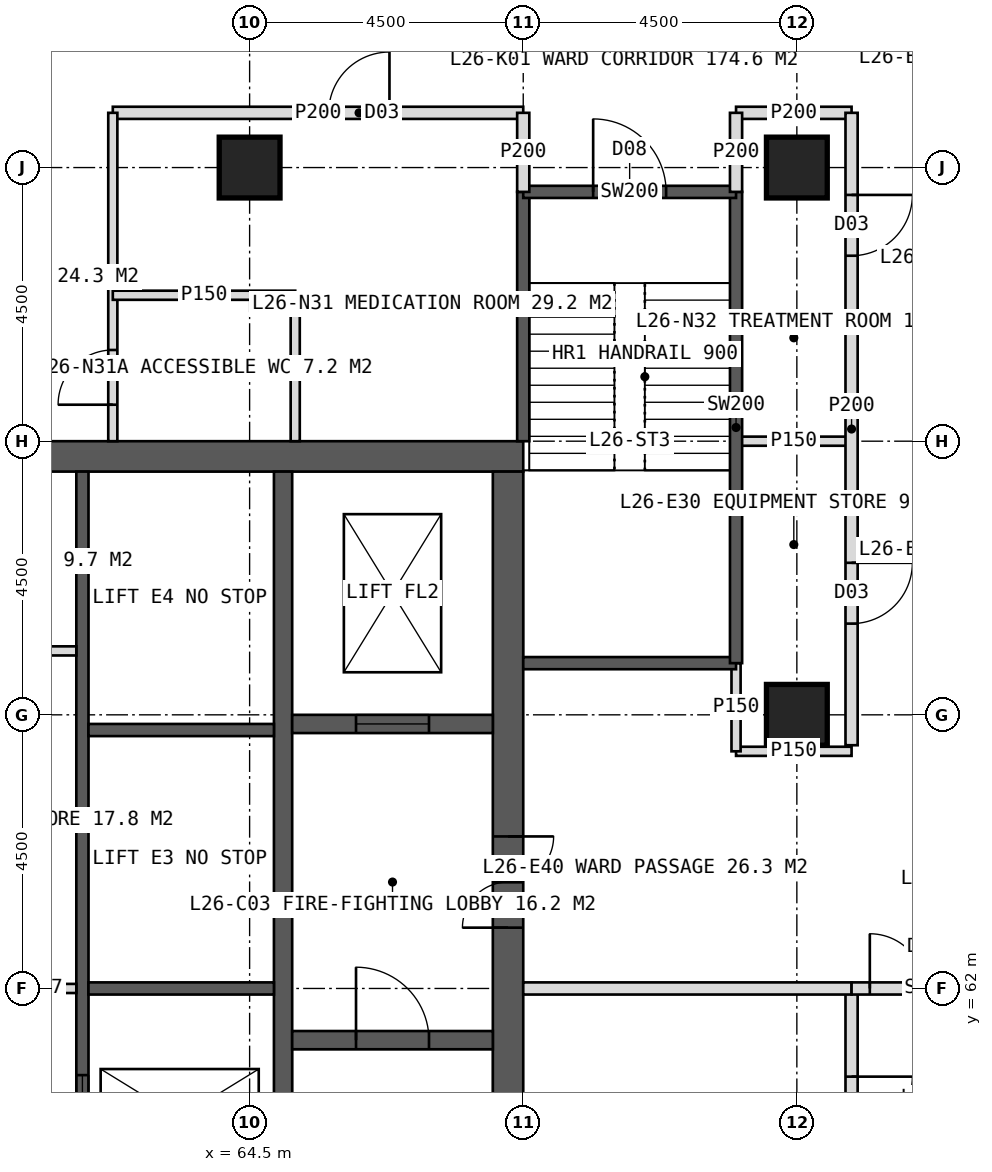
"""IFC4 building model, lengths in metres.
Left out: names, types, materials, properties, quantities, classifications, styles, units other than length and angle.
Written with IfcOpenShell. Run it as: python <this file> out.ifc"""

import sys

from ifc_helpers import new_model, si_unit, direction, frame, frame_2d, origin, origin_2d, place, context, subcontext, project, spatial, rectangle, hollow_rectangle, extrude, element, fill, save


model = new_model("IFC4")
c1 = context("Model", 3, precision=1e-05, world=origin(), true_north=direction((0.0, 1.0)))
c2 = subcontext(c1, "Body", "Model", "MODEL_VIEW")
j1 = project(units=[si_unit("LENGTHUNIT", "METRE"), si_unit("PLANEANGLEUNIT", "RADIAN")], contexts=[c1])
p1 = place(None, origin())
s1 = spatial("IfcSite", under=j1, at=p1, CompositionType="ELEMENT")
p2 = place(p1, origin())
s2 = spatial("IfcBuilding", under=s1, at=p2, CompositionType="ELEMENT")
p3 = place(p2, frame((0.0, 0.0, 112.0)))
s3 = spatial("IfcBuildingStorey", under=s2, at=p3, CompositionType="ELEMENT", Elevation=112.0)
p4 = place(p3, frame((51.0, 70.75, 0.0), z_axis=(0.0, 0.0, 1.0), x_axis=(1.0, 0.0, 0.0)))
e1 = element("IfcWall", 1, at=p4, inside=s3, PredefinedType="SHEAR", context=c2, shape_type="SweptSolid", body=[
    extrude(rectangle(XDim=18.0, YDim=0.5, at=frame_2d((9.0, 0.0))), origin(), (0.0, 0.0, 1.0), 4.0),
])
p5 = place(p4, frame((8.1, 0.0, 0.0)))
e2 = element("IfcOpeningElement", 2, at=p5, cuts=e1, PredefinedType="OPENING", context=c2, shape_type="SweptSolid", body=[
    extrude(rectangle(XDim=1.8, YDim=2.2, at=frame_2d((0.9, 1.1))), frame((0.0, 0.26, 0.0), z_axis=(0.0, -1.0, 0.0), x_axis=(1.0, 0.0, 0.0)), (0.0, 0.0, 1.0), 0.52),
])
p6 = place(p3, frame((68.75, 53.5, 0.0), z_axis=(0.0, 0.0, 1.0), x_axis=(0.0, 1.0, 0.0)))
e3 = element("IfcWall", 3, at=p6, inside=s3, PredefinedType="SHEAR", context=c2, shape_type="SweptSolid", body=[
    extrude(rectangle(XDim=17.0, YDim=0.5, at=frame_2d((8.5, 0.0))), origin(), (0.0, 0.0, 1.0), 4.0),
])
p7 = place(p6, frame((9.5, 0.0, 0.0)))
e4 = element("IfcOpeningElement", 4, at=p7, cuts=e3, PredefinedType="OPENING", context=c2, shape_type="SweptSolid", body=[
    extrude(rectangle(XDim=1.5, YDim=2.2, at=frame_2d((0.75, 1.1))), frame((0.0, 0.26, 0.0), z_axis=(0.0, -1.0, 0.0), x_axis=(1.0, 0.0, 0.0)), (0.0, 0.0, 1.0), 0.52),
])
p8 = place(p3, frame((65.05, 53.5, 0.0), z_axis=(0.0, 0.0, 1.0), x_axis=(0.0, 1.0, 0.0)))
e5 = element("IfcWall", 5, at=p8, inside=s3, PredefinedType="SHEAR", context=c2, shape_type="SweptSolid", body=[
    extrude(rectangle(XDim=17.0, YDim=0.3, at=frame_2d((8.5, 0.0))), origin(), (0.0, 0.0, 1.0), 4.0),
])
p9 = place(p3, frame((61.75, 53.5, 0.0), z_axis=(0.0, 0.0, 1.0), x_axis=(0.0, 1.0, 0.0)))
e6 = element("IfcWall", 6, at=p9, inside=s3, PredefinedType="SHEAR", context=c2, shape_type="SweptSolid", body=[
    extrude(rectangle(XDim=17.0, YDim=0.2, at=frame_2d((8.5, 0.0))), origin(), (0.0, 0.0, 1.0), 4.0),
])
p10 = place(p9, frame((1.375, 0.0, 0.0)))
e7 = element("IfcOpeningElement", 7, at=p10, cuts=e6, PredefinedType="OPENING", context=c2, shape_type="SweptSolid", body=[
    extrude(rectangle(XDim=1.4, YDim=2.2, at=frame_2d((0.7, 1.1))), frame((0.0, 0.11, 0.0), z_axis=(0.0, -1.0, 0.0), x_axis=(1.0, 0.0, 0.0)), (0.0, 0.0, 1.0), 0.22),
])
p11 = place(p9, frame((5.675, 0.0, 0.0)))
e8 = element("IfcOpeningElement", 8, at=p11, cuts=e6, PredefinedType="OPENING", context=c2, shape_type="SweptSolid", body=[
    extrude(rectangle(XDim=1.4, YDim=2.2, at=frame_2d((0.7, 1.1))), frame((0.0, 0.11, 0.0), z_axis=(0.0, -1.0, 0.0), x_axis=(1.0, 0.0, 0.0)), (0.0, 0.0, 1.0), 0.22),
])
for number, where, z_axis, x_axis in (
    (9, (61.85, 62.0, 0.0), (0.0, 0.0, 1.0), (1.0, 0.0, 0.0)),
    (10, (61.85, 66.25, 0.0), (0.0, 0.0, 1.0), (1.0, 0.0, 0.0)),
):
    element("IfcWall", number, at=place(p3, frame(where, z_axis=z_axis, x_axis=x_axis)), inside=s3, PredefinedType="SHEAR", context=c2, shape_type="SweptSolid", body=[
        extrude(rectangle(XDim=3.05, YDim=0.2, at=frame_2d((1.525, 0.0))), origin(), (0.0, 0.0, 1.0), 4.0),
    ])
p12 = place(p3, frame((65.2, 61.15, 0.0), z_axis=(0.0, 0.0, 1.0), x_axis=(1.0, 0.0, 0.0)))
e11 = element("IfcWall", 11, at=p12, inside=s3, PredefinedType="SHEAR", context=c2, shape_type="SweptSolid", body=[
    extrude(rectangle(XDim=3.3, YDim=0.3, at=frame_2d((1.65, 0.0))), origin(), (0.0, 0.0, 1.0), 4.0),
])
p13 = place(p12, frame((1.05, 0.0, 0.0)))
e12 = element("IfcOpeningElement", 12, at=p13, cuts=e11, PredefinedType="OPENING", context=c2, shape_type="SweptSolid", body=[
    extrude(rectangle(XDim=1.2, YDim=2.1, at=frame_2d((0.6, 1.05))), frame((0.0, 0.16, 0.0), z_axis=(0.0, -1.0, 0.0), x_axis=(1.0, 0.0, 0.0)), (0.0, 0.0, 1.0), 0.32),
])
p14 = place(p3, frame((65.2, 66.35, 0.0), z_axis=(0.0, 0.0, 1.0), x_axis=(1.0, 0.0, 0.0)))
e13 = element("IfcWall", 13, at=p14, inside=s3, PredefinedType="SHEAR", context=c2, shape_type="SweptSolid", body=[
    extrude(rectangle(XDim=3.3, YDim=0.3, at=frame_2d((1.65, 0.0))), origin(), (0.0, 0.0, 1.0), 4.0),
])
p15 = place(p14, frame((1.05, 0.0, 0.0)))
e14 = element("IfcOpeningElement", 14, at=p15, cuts=e13, PredefinedType="OPENING", context=c2, shape_type="SweptSolid", body=[
    extrude(rectangle(XDim=1.2, YDim=2.2, at=frame_2d((0.6, 1.1))), frame((0.0, 0.16, 0.0), z_axis=(0.0, -1.0, 0.0), x_axis=(1.0, 0.0, 0.0)), (0.0, 0.0, 1.0), 0.32),
])
for number, where, z_axis, x_axis in (
    (15, (73.5, 75.5, 0.0), (0.0, 0.0, 1.0), (1.0, 0.0, 0.0)),
    (16, (64.5, 75.5, 0.0), (0.0, 0.0, 1.0), (1.0, 0.0, 0.0)),
    (17, (73.5, 66.5, 0.0), (0.0, 0.0, 1.0), (1.0, 0.0, 0.0)),
):
    element("IfcColumn", number, at=place(p3, frame(where, z_axis=z_axis, x_axis=x_axis)), inside=s3, PredefinedType="COLUMN", context=c2, shape_type="SweptSolid", body=[
        extrude(hollow_rectangle(XDim=1.0, YDim=1.0, WallThickness=0.1, at=origin_2d()), origin(), (0.0, 0.0, 1.0), 4.0),
    ])
p16 = place(p3, frame((62.25, 76.4, 0.0), z_axis=(0.0, 0.0, 1.0), x_axis=(1.0, 0.0, 0.0)))
e18 = element("IfcWall", 18, at=p16, inside=s3, PredefinedType="PARTITIONING", context=c2, shape_type="SweptSolid", body=[
    extrude(rectangle(XDim=6.75, YDim=0.2, at=frame_2d((3.375, 0.0))), origin(), (0.0, 0.0, 1.0), 3.75),
])
p17 = place(p16, frame((3.55, 0.0, 0.0)))
e19 = element("IfcOpeningElement", 19, at=p17, cuts=e18, PredefinedType="OPENING", context=c2, shape_type="SweptSolid", body=[
    extrude(rectangle(XDim=1.0, YDim=2.1, at=frame_2d((0.5, 1.05))), frame((0.0, 0.11, 0.0), z_axis=(0.0, -1.0, 0.0), x_axis=(1.0, 0.0, 0.0)), (0.0, 0.0, 1.0), 0.22),
])
p18 = place(p3, frame((72.5, 76.4, 0.0), z_axis=(0.0, 0.0, 1.0), x_axis=(1.0, 0.0, 0.0)))
e20 = element("IfcWall", 20, at=p18, inside=s3, PredefinedType="PARTITIONING", context=c2, shape_type="SweptSolid", body=[
    extrude(rectangle(XDim=1.9, YDim=0.2, at=frame_2d((0.95, 0.0))), origin(), (0.0, 0.0, 1.0), 3.75),
])
p19 = place(p3, frame((62.25, 71.0, 0.0), z_axis=(0.0, 0.0, 1.0), x_axis=(0.0, 1.0, 0.0)))
e21 = element("IfcWall", 21, at=p19, inside=s3, PredefinedType="PARTITIONING", context=c2, shape_type="SweptSolid", body=[
    extrude(rectangle(XDim=5.4, YDim=0.15, at=frame_2d((2.7, 0.0))), origin(), (0.0, 0.0, 1.0), 3.75),
])
p20 = place(p19, frame((0.6, 0.0, 0.0)))
e22 = element("IfcOpeningElement", 22, at=p20, cuts=e21, PredefinedType="OPENING", context=c2, shape_type="SweptSolid", body=[
    extrude(rectangle(XDim=0.9, YDim=2.1, at=frame_2d((0.45, 1.05))), frame((0.0, 0.085, 0.0), z_axis=(0.0, -1.0, 0.0), x_axis=(1.0, 0.0, 0.0)), (0.0, 0.0, 1.0), 0.17),
])
p21 = place(p3, frame((62.25, 73.4, 0.0), z_axis=(0.0, 0.0, 1.0), x_axis=(1.0, 0.0, 0.0)))
e23 = element("IfcWall", 23, at=p21, inside=s3, PredefinedType="PARTITIONING", context=c2, shape_type="SweptSolid", body=[
    extrude(rectangle(XDim=3.0, YDim=0.15, at=frame_2d((1.5, 0.0))), origin(), (0.0, 0.0, 1.0), 3.75),
])
p22 = place(p3, frame((65.25, 71.0, 0.0), z_axis=(0.0, 0.0, 1.0), x_axis=(0.0, 1.0, 0.0)))
e24 = element("IfcWall", 24, at=p22, inside=s3, PredefinedType="PARTITIONING", context=c2, shape_type="SweptSolid", body=[
    extrude(rectangle(XDim=2.4, YDim=0.15, at=frame_2d((1.2, 0.0))), origin(), (0.0, 0.0, 1.0), 3.75),
])
p23 = place(p3, frame((72.5, 71.0, 0.0), z_axis=(0.0, 0.0, 1.0), x_axis=(1.0, 0.0, 0.0)))
e25 = element("IfcWall", 25, at=p23, inside=s3, PredefinedType="PARTITIONING", context=c2, shape_type="SweptSolid", body=[
    extrude(rectangle(XDim=1.9, YDim=0.15, at=frame_2d((0.95, 0.0))), origin(), (0.0, 0.0, 1.0), 3.75),
])
p24 = place(p3, frame((74.4, 76.4, 0.0), z_axis=(0.0, 0.0, 1.0), x_axis=(0.0, -1.0, 0.0)))
e26 = element("IfcWall", 26, at=p24, inside=s3, PredefinedType="PARTITIONING", context=c2, shape_type="SweptSolid", body=[
    extrude(rectangle(XDim=10.4, YDim=0.2, at=frame_2d((5.2, 0.0))), origin(), (0.0, 0.0, 1.0), 3.75),
])
p25 = place(p24, frame((1.35, 0.0, 0.0)))
e27 = element("IfcOpeningElement", 27, at=p25, cuts=e26, PredefinedType="OPENING", context=c2, shape_type="SweptSolid", body=[
    extrude(rectangle(XDim=1.0, YDim=2.1, at=frame_2d((0.5, 1.05))), frame((0.0, 0.11, 0.0), z_axis=(0.0, -1.0, 0.0), x_axis=(1.0, 0.0, 0.0)), (0.0, 0.0, 1.0), 0.22),
])
p26 = place(p24, frame((7.4, 0.0, 0.0)))
e28 = element("IfcOpeningElement", 28, at=p26, cuts=e26, PredefinedType="OPENING", context=c2, shape_type="SweptSolid", body=[
    extrude(rectangle(XDim=1.0, YDim=2.1, at=frame_2d((0.5, 1.05))), frame((0.0, 0.11, 0.0), z_axis=(0.0, -1.0, 0.0), x_axis=(1.0, 0.0, 0.0)), (0.0, 0.0, 1.0), 0.22),
])
p27 = place(p3, frame((74.4, 62.0, 0.0), z_axis=(0.0, 0.0, 1.0), x_axis=(0.0, -1.0, 0.0)))
e29 = element("IfcWall", 29, at=p27, inside=s3, PredefinedType="PARTITIONING", context=c2, shape_type="SweptSolid", body=[
    extrude(rectangle(XDim=14.4, YDim=0.2, at=frame_2d((7.2, 0.0))), origin(), (0.0, 0.0, 1.0), 3.75),
])
p28 = place(p27, frame((1.45, 0.0, 0.0)))
e30 = element("IfcOpeningElement", 30, at=p28, cuts=e29, PredefinedType="OPENING", context=c2, shape_type="SweptSolid", body=[
    extrude(rectangle(XDim=1.0, YDim=2.1, at=frame_2d((0.5, 1.05))), frame((0.0, 0.11, 0.0), z_axis=(0.0, -1.0, 0.0), x_axis=(1.0, 0.0, 0.0)), (0.0, 0.0, 1.0), 0.22),
])
p29 = place(p27, frame((11.2, 0.0, 0.0)))
e31 = element("IfcOpeningElement", 31, at=p29, cuts=e29, PredefinedType="OPENING", context=c2, shape_type="SweptSolid", body=[
    extrude(rectangle(XDim=1.0, YDim=2.1, at=frame_2d((0.5, 1.05))), frame((0.0, 0.11, 0.0), z_axis=(0.0, -1.0, 0.0), x_axis=(1.0, 0.0, 0.0)), (0.0, 0.0, 1.0), 0.22),
])
p30 = place(p3, frame((72.5, 65.9, 0.0), z_axis=(0.0, 0.0, 1.0), x_axis=(1.0, 0.0, 0.0)))
e32 = element("IfcWall", 32, at=p30, inside=s3, PredefinedType="PARTITIONING", context=c2, shape_type="SweptSolid", body=[
    extrude(rectangle(XDim=1.9, YDim=0.15, at=frame_2d((0.95, 0.0))), origin(), (0.0, 0.0, 1.0), 3.75),
])
p31 = place(p3, frame((69.0, 62.0, 0.0), z_axis=(0.0, 0.0, 1.0), x_axis=(1.0, 0.0, 0.0)))
e33 = element("IfcWall", 33, at=p31, inside=s3, PredefinedType="SOLIDWALL", context=c2, shape_type="SweptSolid", body=[
    extrude(rectangle(XDim=5.4, YDim=0.2, at=frame_2d((2.7, 0.0))), origin(), (0.0, 0.0, 1.0), 2.95),
])
p32 = place(p3, frame((74.4, 62.0, 0.0), z_axis=(0.0, 0.0, 1.0), x_axis=(1.0, 0.0, 0.0)))
e34 = element("IfcWall", 34, at=p32, inside=s3, PredefinedType="SOLIDWALL", context=c2, shape_type="SweptSolid", body=[
    extrude(rectangle(XDim=2.7, YDim=0.2, at=frame_2d((1.35, 0.0))), origin(), (0.0, 0.0, 1.0), 2.95),
])
p33 = place(p32, frame((0.3, 0.0, 0.0)))
e35 = element("IfcOpeningElement", 35, at=p33, cuts=e34, PredefinedType="OPENING", context=c2, shape_type="SweptSolid", body=[
    extrude(rectangle(XDim=1.8, YDim=2.2, at=frame_2d((0.9, 1.1))), frame((0.0, 0.11, 0.0), z_axis=(0.0, -1.0, 0.0), x_axis=(1.0, 0.0, 0.0)), (0.0, 0.0, 1.0), 0.22),
])
p34 = place(p3, frame((58.35, 62.0, 0.0), z_axis=(0.0, 0.0, 1.0), x_axis=(1.0, 0.0, 0.0)))
e36 = element("IfcWall", 36, at=p34, inside=s3, PredefinedType="PARTITIONING", context=c2, shape_type="SweptSolid", body=[
    extrude(rectangle(XDim=3.3, YDim=0.15, at=frame_2d((1.65, 0.0))), origin(), (0.0, 0.0, 1.0), 3.75),
])
p35 = place(p34, frame((1.15, 0.0, 0.0)))
e37 = element("IfcOpeningElement", 37, at=p35, cuts=e36, PredefinedType="OPENING", context=c2, shape_type="SweptSolid", body=[
    extrude(rectangle(XDim=1.0, YDim=2.1, at=frame_2d((0.5, 1.05))), frame((0.0, 0.085, 0.0), z_axis=(0.0, -1.0, 0.0), x_axis=(1.0, 0.0, 0.0)), (0.0, 0.0, 1.0), 0.17),
])
p36 = place(p3, frame((58.35, 67.551, 0.0), z_axis=(0.0, 0.0, 1.0), x_axis=(1.0, 0.0, 0.0)))
e38 = element("IfcWall", 38, at=p36, inside=s3, PredefinedType="PARTITIONING", context=c2, shape_type="SweptSolid", body=[
    extrude(rectangle(XDim=3.3, YDim=0.15, at=frame_2d((1.65, 0.0))), origin(), (0.0, 0.0, 1.0), 3.75),
])
p37 = place(p3, frame((72.5, 65.9, 0.0), z_axis=(0.0, 0.0, 1.0), x_axis=(0.0, 1.0, 0.0)))
e39 = element("IfcWall", 39, at=p37, inside=s3, PredefinedType="PARTITIONING", context=c2, shape_type="SweptSolid", body=[
    extrude(rectangle(XDim=1.45, YDim=0.15, at=frame_2d((0.725, 0.0))), origin(), (0.0, 0.0, 1.0), 3.75),
])
p38 = place(p3, frame((69.0, 71.0, 0.0), z_axis=(0.0, 0.0, 1.0), x_axis=(0.0, 1.0, 0.0)))
e40 = element("IfcWall", 40, at=p38, inside=s3, PredefinedType="SOLIDWALL", context=c2, shape_type="SweptSolid", body=[
    extrude(rectangle(XDim=4.1, YDim=0.2, at=frame_2d((2.05, 0.0))), origin(), (0.0, 0.0, 1.0), 3.75),
])
p39 = place(p3, frame((69.0, 67.35, 0.0), z_axis=(0.0, 0.0, 1.0), x_axis=(1.0, 0.0, 0.0)))
e41 = element("IfcWall", 41, at=p39, inside=s3, PredefinedType="SOLIDWALL", context=c2, shape_type="SweptSolid", body=[
    extrude(rectangle(XDim=3.5, YDim=0.2, at=frame_2d((1.75, 0.0))), origin(), (0.0, 0.0, 1.0), 3.75),
])
p40 = place(p3, frame((72.5, 67.35, 0.0), z_axis=(0.0, 0.0, 1.0), x_axis=(0.0, 1.0, 0.0)))
e42 = element("IfcWall", 42, at=p40, inside=s3, PredefinedType="SOLIDWALL", context=c2, shape_type="SweptSolid", body=[
    extrude(rectangle(XDim=7.75, YDim=0.2, at=frame_2d((3.875, 0.0))), origin(), (0.0, 0.0, 1.0), 3.75),
])
p41 = place(p3, frame((69.0, 75.1, 0.0), z_axis=(0.0, 0.0, 1.0), x_axis=(1.0, 0.0, 0.0)))
e43 = element("IfcWall", 43, at=p41, inside=s3, PredefinedType="SOLIDWALL", context=c2, shape_type="SweptSolid", body=[
    extrude(rectangle(XDim=3.5, YDim=0.2, at=frame_2d((1.75, 0.0))), origin(), (0.0, 0.0, 1.0), 3.75),
])
p42 = place(p41, frame((1.15, 0.0, 0.0)))
e44 = element("IfcOpeningElement", 44, at=p42, cuts=e43, PredefinedType="OPENING", context=c2, shape_type="SweptSolid", body=[
    extrude(rectangle(XDim=1.2, YDim=2.1, at=frame_2d((0.6, 1.05))), frame((0.0, 0.11, 0.0), z_axis=(0.0, -1.0, 0.0), x_axis=(1.0, 0.0, 0.0)), (0.0, 0.0, 1.0), 0.22),
])
for number, where, z_axis, x_axis in (
    (45, (69.0, 75.1, 0.0), (0.0, 0.0, 1.0), (0.0, 1.0, 0.0)),
    (46, (72.5, 75.1, 0.0), (0.0, 0.0, 1.0), (0.0, 1.0, 0.0)),
):
    element("IfcWall", number, at=place(p3, frame(where, z_axis=z_axis, x_axis=x_axis)), inside=s3, PredefinedType="PARTITIONING", context=c2, shape_type="SweptSolid", body=[
        extrude(rectangle(XDim=1.3, YDim=0.2, at=frame_2d((0.65, 0.0))), origin(), (0.0, 0.0, 1.0), 3.75),
    ])
p43 = place(p20, origin())
e47 = element("IfcDoor", 47, at=p43, inside=s3, OperationType="SINGLE_SWING_LEFT", PredefinedType="DOOR", context=c2, shape_type="SweptSolid", body=[
    extrude(rectangle(XDim=0.9, YDim=2.1, at=frame_2d((0.45, 1.05))), frame((0.0, 0.025, 0.0), z_axis=(0.0, -1.0, 0.0), x_axis=(1.0, 0.0, 0.0)), (0.0, 0.0, 1.0), 0.05),
])
fill(e22, e47)
p44 = place(p17, origin())
e48 = element("IfcDoor", 48, at=p44, inside=s3, OperationType="SINGLE_SWING_RIGHT", PredefinedType="DOOR", context=c2, shape_type="SweptSolid", body=[
    extrude(rectangle(XDim=1.0, YDim=2.1, at=frame_2d((0.5, 1.05))), frame((0.0, 0.025, 0.0), z_axis=(0.0, -1.0, 0.0), x_axis=(1.0, 0.0, 0.0)), (0.0, 0.0, 1.0), 0.05),
])
fill(e19, e48)
p45 = place(p25, origin())
e49 = element("IfcDoor", 49, at=p45, inside=s3, OperationType="SINGLE_SWING_LEFT", PredefinedType="DOOR", context=c2, shape_type="SweptSolid", body=[
    extrude(rectangle(XDim=1.0, YDim=2.1, at=frame_2d((0.5, 1.05))), frame((0.0, 0.025, 0.0), z_axis=(0.0, -1.0, 0.0), x_axis=(1.0, 0.0, 0.0)), (0.0, 0.0, 1.0), 0.05),
])
fill(e27, e49)
p46 = place(p26, origin())
e50 = element("IfcDoor", 50, at=p46, inside=s3, OperationType="SINGLE_SWING_LEFT", PredefinedType="DOOR", context=c2, shape_type="SweptSolid", body=[
    extrude(rectangle(XDim=1.0, YDim=2.1, at=frame_2d((0.5, 1.05))), frame((0.0, 0.025, 0.0), z_axis=(0.0, -1.0, 0.0), x_axis=(1.0, 0.0, 0.0)), (0.0, 0.0, 1.0), 0.05),
])
fill(e28, e50)
p47 = place(p28, origin())
e51 = element("IfcDoor", 51, at=p47, inside=s3, OperationType="SINGLE_SWING_LEFT", PredefinedType="DOOR", context=c2, shape_type="SweptSolid", body=[
    extrude(rectangle(XDim=1.0, YDim=2.1, at=frame_2d((0.5, 1.05))), frame((0.0, 0.025, 0.0), z_axis=(0.0, -1.0, 0.0), x_axis=(1.0, 0.0, 0.0)), (0.0, 0.0, 1.0), 0.05),
])
fill(e30, e51)
p48 = place(p33, origin())
e52 = element("IfcDoor", 52, at=p48, inside=s3, OperationType="DOUBLE_DOOR_DOUBLE_SWING", PredefinedType="DOOR", context=c2, shape_type="SweptSolid", body=[
    extrude(rectangle(XDim=1.8, YDim=2.2, at=frame_2d((0.9, 1.1))), frame((0.0, 0.025, 0.0), z_axis=(0.0, -1.0, 0.0), x_axis=(1.0, 0.0, 0.0)), (0.0, 0.0, 1.0), 0.05),
])
fill(e35, e52)
p49 = place(p7, origin())
e53 = element("IfcDoor", 53, at=p49, inside=s3, OperationType="DOUBLE_DOOR_SINGLE_SWING", PredefinedType="DOOR", context=c2, shape_type="SweptSolid", body=[
    extrude(rectangle(XDim=1.5, YDim=2.2, at=frame_2d((0.75, 1.1))), frame((0.0, 0.025, 0.0), z_axis=(0.0, -1.0, 0.0), x_axis=(1.0, 0.0, 0.0)), (0.0, 0.0, 1.0), 0.05),
])
fill(e4, e53)
p50 = place(p13, origin())
e54 = element("IfcDoor", 54, at=p50, inside=s3, OperationType="SINGLE_SWING_LEFT", PredefinedType="DOOR", context=c2, shape_type="SweptSolid", body=[
    extrude(rectangle(XDim=1.2, YDim=2.1, at=frame_2d((0.6, 1.05))), frame((0.0, 0.025, 0.0), z_axis=(0.0, -1.0, 0.0), x_axis=(1.0, 0.0, 0.0)), (0.0, 0.0, 1.0), 0.05),
])
fill(e12, e54)
p51 = place(p15, origin())
e55 = element("IfcDoor", 55, at=p51, inside=s3, OperationType="SLIDING_TO_LEFT", PredefinedType="DOOR", context=c2, shape_type="SweptSolid", body=[
    extrude(rectangle(XDim=1.2, YDim=2.2, at=frame_2d((0.6, 1.1))), frame((0.0, 0.025, 0.0), z_axis=(0.0, -1.0, 0.0), x_axis=(1.0, 0.0, 0.0)), (0.0, 0.0, 1.0), 0.05),
])
fill(e14, e55)
p52 = place(p11, origin())
e56 = element("IfcDoor", 56, at=p52, inside=s3, OperationType="SLIDING_TO_LEFT", PredefinedType="DOOR", context=c2, shape_type="SweptSolid", body=[
    extrude(rectangle(XDim=1.4, YDim=2.2, at=frame_2d((0.7, 1.1))), frame((0.0, 0.025, 0.0), z_axis=(0.0, -1.0, 0.0), x_axis=(1.0, 0.0, 0.0)), (0.0, 0.0, 1.0), 0.05),
])
fill(e8, e56)
p53 = place(p42, origin())
e57 = element("IfcDoor", 57, at=p53, inside=s3, OperationType="SINGLE_SWING_LEFT", PredefinedType="DOOR", context=c2, shape_type="SweptSolid", body=[
    extrude(rectangle(XDim=1.2, YDim=2.1, at=frame_2d((0.6, 1.05))), frame((0.0, 0.025, 0.0), z_axis=(0.0, -1.0, 0.0), x_axis=(1.0, 0.0, 0.0)), (0.0, 0.0, 1.0), 0.05),
])
fill(e44, e57)
save(model, sys.argv[1])
